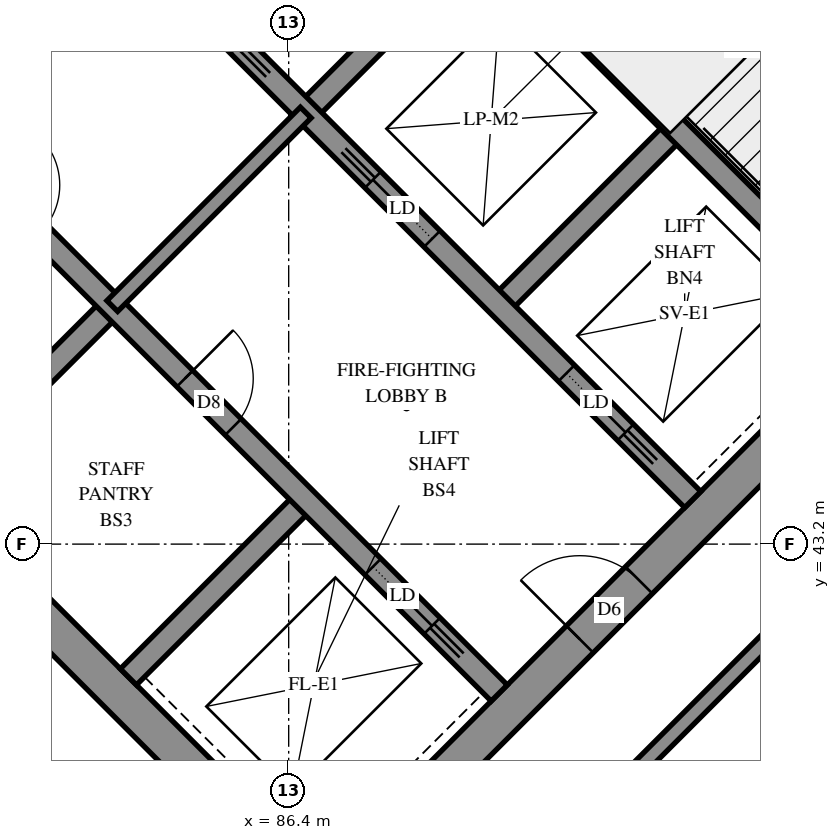
"""IFC4 building model, lengths in metres.
Left out: names, types, materials, properties, quantities, classifications, styles, units other than length and angle.
Written with IfcOpenShell. Run it as: python <this file> out.ifc"""

import sys

from ifc_helpers import new_model, si_unit, direction, frame, frame_2d, origin, place, context, subcontext, project, spatial, rectangle, extrude, element, fill, save


model = new_model("IFC4")
c1 = context("Model", 3, precision=1e-05, world=origin(), true_north=direction((0.0, 1.0)))
c2 = subcontext(c1, "Body", "Model", "MODEL_VIEW")
j1 = project(units=[si_unit("LENGTHUNIT", "METRE"), si_unit("PLANEANGLEUNIT", "RADIAN")], contexts=[c1])
p1 = place(None, origin())
s1 = spatial("IfcSite", under=j1, at=p1, CompositionType="ELEMENT")
p2 = place(p1, origin())
s2 = spatial("IfcBuilding", under=s1, at=p2, CompositionType="ELEMENT")
p3 = place(p2, frame((0.0, 0.0, 227.0)))
s3 = spatial("IfcBuildingStorey", under=s2, at=p3, CompositionType="ELEMENT", Elevation=227.0)
p4 = place(p3, frame((76.124, 49.267, -0.3), z_axis=(0.0, 0.0, 1.0), x_axis=(0.7071067812, -0.7071067812, 0.0)))
e1 = element("IfcWall", 1, at=p4, inside=s3, PredefinedType="SHEAR", context=c2, shape_type="SweptSolid", body=[
    extrude(rectangle(XDim=15.4, YDim=0.5, at=frame_2d((7.7, 0.0))), origin(), (0.0, 0.0, 1.0), 2.7),
])
p5 = place(p3, frame((86.66, 59.802, -0.3), z_axis=(0.0, 0.0, 1.0), x_axis=(0.7071067812, -0.7071067812, 0.0)))
e2 = element("IfcWall", 2, at=p5, inside=s3, PredefinedType="SHEAR", context=c2, shape_type="SweptSolid", body=[
    extrude(rectangle(XDim=15.4, YDim=0.5, at=frame_2d((7.7, 0.0))), origin(), (0.0, 0.0, 1.0), 2.7),
])
p6 = place(p5, frame((10.5, 0.0, 0.3)))
e3 = element("IfcOpeningElement", 3, at=p6, cuts=e2, PredefinedType="OPENING", context=c2, shape_type="SweptSolid", body=[
    extrude(rectangle(XDim=0.8, YDim=2.1, at=frame_2d((0.4, 1.05))), frame((0.0, 0.26, 0.0), z_axis=(0.0, -1.0, 0.0), x_axis=(1.0, 0.0, 0.0)), (0.0, 0.0, 1.0), 0.52),
])
p7 = place(p3, frame((76.478, 49.267, -0.3), z_axis=(0.0, 0.0, 1.0), x_axis=(0.7071067812, 0.7071067812, 0.0)))
e4 = element("IfcWall", 4, at=p7, inside=s3, PredefinedType="SHEAR", context=c2, shape_type="SweptSolid", body=[
    extrude(rectangle(XDim=14.4, YDim=0.5, at=frame_2d((7.2, 0.0))), origin(), (0.0, 0.0, 1.0), 2.7),
])
p8 = place(p7, frame((4.55, 0.0, 0.3)))
e5 = element("IfcOpeningElement", 5, at=p8, cuts=e4, PredefinedType="OPENING", context=c2, shape_type="SweptSolid", body=[
    extrude(rectangle(XDim=1.1, YDim=2.1, at=frame_2d((0.55, 1.05))), frame((0.0, 0.26, 0.0), z_axis=(0.0, -1.0, 0.0), x_axis=(1.0, 0.0, 0.0)), (0.0, 0.0, 1.0), 0.52),
])
p9 = place(p7, frame((11.35, 0.0, 0.3)))
e6 = element("IfcOpeningElement", 6, at=p9, cuts=e4, PredefinedType="OPENING", context=c2, shape_type="SweptSolid", body=[
    extrude(rectangle(XDim=1.1, YDim=2.1, at=frame_2d((0.55, 1.05))), frame((0.0, 0.26, 0.0), z_axis=(0.0, -1.0, 0.0), x_axis=(1.0, 0.0, 0.0)), (0.0, 0.0, 1.0), 0.52),
])
p10 = place(p3, frame((87.013, 38.731, -0.3), z_axis=(0.0, 0.0, 1.0), x_axis=(0.7071067812, 0.7071067812, 0.0)))
e7 = element("IfcWall", 7, at=p10, inside=s3, PredefinedType="SHEAR", context=c2, shape_type="SweptSolid", body=[
    extrude(rectangle(XDim=14.4, YDim=0.5, at=frame_2d((7.2, 0.0))), origin(), (0.0, 0.0, 1.0), 2.7),
])
p11 = place(p10, frame((4.55, 0.0, 0.3)))
e8 = element("IfcOpeningElement", 8, at=p11, cuts=e7, PredefinedType="OPENING", context=c2, shape_type="SweptSolid", body=[
    extrude(rectangle(XDim=1.1, YDim=2.1, at=frame_2d((0.55, 1.05))), frame((0.0, 0.26, 0.0), z_axis=(0.0, -1.0, 0.0), x_axis=(1.0, 0.0, 0.0)), (0.0, 0.0, 1.0), 0.52),
])
p12 = place(p10, frame((11.35, 0.0, 0.3)))
e9 = element("IfcOpeningElement", 9, at=p12, cuts=e7, PredefinedType="OPENING", context=c2, shape_type="SweptSolid", body=[
    extrude(rectangle(XDim=1.1, YDim=2.1, at=frame_2d((0.55, 1.05))), frame((0.0, 0.26, 0.0), z_axis=(0.0, -1.0, 0.0), x_axis=(1.0, 0.0, 0.0)), (0.0, 0.0, 1.0), 0.52),
])
p13 = place(p3, frame((81.746, 43.999, 0.0), z_axis=(0.0, 0.0, 1.0), x_axis=(0.7071067812, 0.7071067812, 0.0)))
e10 = element("IfcWall", 10, at=p13, inside=s3, PredefinedType="SOLIDWALL", context=c2, shape_type="SweptSolid", body=[
    extrude(rectangle(XDim=3.3, YDim=0.3, at=frame_2d((1.65, 0.0))), origin(), (0.0, 0.0, 1.0), 3.1),
])
p14 = place(p3, frame((86.625, 48.878, 0.0), z_axis=(0.0, 0.0, 1.0), x_axis=(0.7071067812, 0.7071067812, 0.0)))
e11 = element("IfcWall", 11, at=p14, inside=s3, PredefinedType="SOLIDWALL", context=c2, shape_type="SweptSolid", body=[
    extrude(rectangle(XDim=3.3, YDim=0.3, at=frame_2d((1.65, 0.0))), origin(), (0.0, 0.0, 1.0), 3.1),
])
p15 = place(p3, frame((84.291, 41.453, 0.0), z_axis=(0.0, 0.0, 1.0), x_axis=(0.7071067812, 0.7071067812, 0.0)))
e12 = element("IfcWall", 12, at=p15, inside=s3, PredefinedType="SOLIDWALL", context=c2, shape_type="SweptSolid", body=[
    extrude(rectangle(XDim=3.3, YDim=0.3, at=frame_2d((1.65, 0.0))), origin(), (0.0, 0.0, 1.0), 3.1),
])
p16 = place(p3, frame((89.17, 46.332, 0.0), z_axis=(0.0, 0.0, 1.0), x_axis=(0.7071067812, 0.7071067812, 0.0)))
e13 = element("IfcWall", 13, at=p16, inside=s3, PredefinedType="SOLIDWALL", context=c2, shape_type="SweptSolid", body=[
    extrude(rectangle(XDim=3.3, YDim=0.3, at=frame_2d((1.65, 0.0))), origin(), (0.0, 0.0, 1.0), 3.1),
])
p17 = place(p3, frame((78.988, 51.423, 0.0), z_axis=(0.0, 0.0, 1.0), x_axis=(0.7071067812, -0.7071067812, 0.0)))
e14 = element("IfcWall", 14, at=p17, inside=s3, PredefinedType="SOLIDWALL", context=c2, shape_type="SweptSolid", body=[
    extrude(rectangle(XDim=14.4, YDim=0.3, at=frame_2d((7.2, 0.0))), origin(), (0.0, 0.0, 1.0), 3.1),
])
p18 = place(p17, frame((1.35, 0.0, 0.0)))
e15 = element("IfcOpeningElement", 15, at=p18, cuts=e14, PredefinedType="OPENING", context=c2, shape_type="SweptSolid", body=[
    extrude(rectangle(XDim=0.9, YDim=2.1, at=frame_2d((0.45, 1.05))), frame((0.0, 0.16, 0.0), z_axis=(0.0, -1.0, 0.0), x_axis=(1.0, 0.0, 0.0)), (0.0, 0.0, 1.0), 0.32),
])
p19 = place(p17, frame((4.95, 0.0, 0.0)))
e16 = element("IfcOpeningElement", 16, at=p19, cuts=e14, PredefinedType="OPENING", context=c2, shape_type="SweptSolid", body=[
    extrude(rectangle(XDim=0.9, YDim=2.1, at=frame_2d((0.45, 1.05))), frame((0.0, 0.16, 0.0), z_axis=(0.0, -1.0, 0.0), x_axis=(1.0, 0.0, 0.0)), (0.0, 0.0, 1.0), 0.32),
])
p20 = place(p17, frame((8.55, 0.0, 0.0)))
e17 = element("IfcOpeningElement", 17, at=p20, cuts=e14, PredefinedType="OPENING", context=c2, shape_type="SweptSolid", body=[
    extrude(rectangle(XDim=0.9, YDim=2.1, at=frame_2d((0.45, 1.05))), frame((0.0, 0.16, 0.0), z_axis=(0.0, -1.0, 0.0), x_axis=(1.0, 0.0, 0.0)), (0.0, 0.0, 1.0), 0.32),
])
p21 = place(p17, frame((12.05, 0.0, 0.0)))
e18 = element("IfcOpeningElement", 18, at=p21, cuts=e14, PredefinedType="OPENING", context=c2, shape_type="SweptSolid", body=[
    extrude(rectangle(XDim=1.1, YDim=2.1, at=frame_2d((0.55, 1.05))), frame((0.0, 0.16, 0.0), z_axis=(0.0, -1.0, 0.0), x_axis=(1.0, 0.0, 0.0)), (0.0, 0.0, 1.0), 0.32),
])
p22 = place(p3, frame((81.534, 53.969, 0.0), z_axis=(0.0, 0.0, 1.0), x_axis=(0.707103309, -0.7071102534, 0.0)))
e19 = element("IfcWall", 19, at=p22, inside=s3, PredefinedType="SOLIDWALL", context=c2, shape_type="SweptSolid", body=[
    extrude(rectangle(XDim=14.4, YDim=0.3, at=frame_2d((7.2, 0.0))), origin(), (0.0, 0.0, 1.0), 3.1),
])
p23 = place(p22, frame((1.25, 0.0, 0.0)))
e20 = element("IfcOpeningElement", 20, at=p23, cuts=e19, PredefinedType="OPENING", context=c2, shape_type="SweptSolid", body=[
    extrude(rectangle(XDim=1.1, YDim=2.1, at=frame_2d((0.55, 1.05))), frame((0.0, 0.16, 0.0), z_axis=(0.0, -1.0, 0.0), x_axis=(1.0, 0.0, 0.0)), (0.0, 0.0, 1.0), 0.32),
])
p24 = place(p22, frame((4.85, 0.0, 0.0)))
e21 = element("IfcOpeningElement", 21, at=p24, cuts=e19, PredefinedType="OPENING", context=c2, shape_type="SweptSolid", body=[
    extrude(rectangle(XDim=1.1, YDim=2.1, at=frame_2d((0.55, 1.05))), frame((0.0, 0.16, 0.0), z_axis=(0.0, -1.0, 0.0), x_axis=(1.0, 0.0, 0.0)), (0.0, 0.0, 1.0), 0.32),
])
p25 = place(p22, frame((8.45, 0.0, 0.0)))
e22 = element("IfcOpeningElement", 22, at=p25, cuts=e19, PredefinedType="OPENING", context=c2, shape_type="SweptSolid", body=[
    extrude(rectangle(XDim=1.1, YDim=2.1, at=frame_2d((0.55, 1.05))), frame((0.0, 0.16, 0.0), z_axis=(0.0, -1.0, 0.0), x_axis=(1.0, 0.0, 0.0)), (0.0, 0.0, 1.0), 0.32),
])
p26 = place(p22, frame((12.05, 0.0, 0.0)))
e23 = element("IfcOpeningElement", 23, at=p26, cuts=e19, PredefinedType="OPENING", context=c2, shape_type="SweptSolid", body=[
    extrude(rectangle(XDim=1.1, YDim=2.1, at=frame_2d((0.55, 1.05))), frame((0.0, 0.16, 0.0), z_axis=(0.0, -1.0, 0.0), x_axis=(1.0, 0.0, 0.0)), (0.0, 0.0, 1.0), 0.32),
])
p27 = place(p3, frame((88.958, 51.211, 0.0), z_axis=(0.0, 0.0, 1.0), x_axis=(0.7070998367, -0.7071137256, 0.0)))
e24 = element("IfcWall", 24, at=p27, inside=s3, PredefinedType="SOLIDWALL", context=c2, shape_type="SweptSolid", body=[
    extrude(rectangle(XDim=7.2, YDim=0.3, at=frame_2d((3.6, 0.0))), origin(), (0.0, 0.0, 1.0), 3.1),
])
p28 = place(p3, frame((91.313, 53.354, 0.0), z_axis=(0.0, 0.0, 1.0), x_axis=(0.7071067812, -0.7071067812, 0.0)))
e25 = element("IfcWall", 25, at=p28, inside=s3, PredefinedType="PARTITIONING", context=c2, shape_type="SweptSolid", body=[
    extrude(rectangle(XDim=5.95, YDim=0.15, at=frame_2d((2.975, 0.0))), origin(), (0.0, 0.0, 1.0), 3.1),
])
p29 = place(p3, frame((84.079, 46.332, 0.0), z_axis=(0.0, 0.0, 1.0), x_axis=(0.7071067812, 0.7071067812, 0.0)))
e26 = element("IfcWall", 26, at=p29, inside=s3, PredefinedType="PARTITIONING", context=c2, shape_type="SweptSolid", body=[
    extrude(rectangle(XDim=3.6, YDim=0.2, at=frame_2d((1.8, 0.0))), origin(), (0.0, 0.0, 1.0), 3.1),
])
p30 = place(p3, frame((85.026, 32.008, 0.0), z_axis=(0.0, 0.0, 1.0), x_axis=(0.7071030933, 0.707110469, 0.0)))
e27 = element("IfcWall", 27, at=p30, inside=s3, PredefinedType="PARTITIONING", context=c2, shape_type="SweptSolid", body=[
    extrude(rectangle(XDim=13.558, YDim=0.2, at=frame_2d((6.779, 0.0))), origin(), (0.0, 0.0, 1.0), 3.1),
])
p31 = place(p3, frame((86.835, 36.079, 0.0), z_axis=(0.0, 0.0, 1.0), x_axis=(0.7071067812, 0.7071067812, 0.0)))
e28 = element("IfcWall", 28, at=p31, inside=s3, PredefinedType="PARTITIONING", context=c2, shape_type="SweptSolid", body=[
    extrude(rectangle(XDim=9.402, YDim=0.2, at=frame_2d((4.701, 0.0))), origin(), (0.0, 0.0, 1.0), 3.1),
])
p32 = place(p3, frame((80.849, 42.061, 0.0), z_axis=(0.0, 0.0, 1.0), x_axis=(0.7071067812, -0.7071067812, 0.0)))
e29 = element("IfcWall", 29, at=p32, inside=s3, PredefinedType="PARTITIONING", context=c2, shape_type="SweptSolid", body=[
    extrude(rectangle(XDim=6.964, YDim=0.2, at=frame_2d((3.482, 0.0))), origin(), (0.0, 0.0, 1.0), 3.1),
])
p33 = place(p32, frame((5.159, 0.0, 0.0)))
e30 = element("IfcOpeningElement", 30, at=p33, cuts=e29, PredefinedType="OPENING", context=c2, shape_type="SweptSolid", body=[
    extrude(rectangle(XDim=0.9, YDim=2.1, at=frame_2d((0.45, 1.05))), frame((0.0, 0.11, 0.0), z_axis=(0.0, -1.0, 0.0), x_axis=(1.0, 0.0, 0.0)), (0.0, 0.0, 1.0), 0.22),
])
p34 = place(p11, origin())
e31 = element("IfcDoor", 31, at=p34, inside=s3, OperationType="DOUBLE_DOOR_SINGLE_SWING", PredefinedType="DOOR", context=c2, shape_type="SweptSolid", body=[
    extrude(rectangle(XDim=1.1, YDim=2.1, at=frame_2d((0.55, 1.05))), frame((0.0, 0.025, 0.0), z_axis=(0.0, -1.0, 0.0), x_axis=(1.0, 0.0, 0.0)), (0.0, 0.0, 1.0), 0.05),
])
fill(e8, e31)
p35 = place(p20, origin())
e32 = element("IfcDoor", 32, at=p35, inside=s3, OperationType="SINGLE_SWING_LEFT", PredefinedType="DOOR", context=c2, shape_type="SweptSolid", body=[
    extrude(rectangle(XDim=0.9, YDim=2.1, at=frame_2d((0.45, 1.05))), frame((0.0, 0.025, 0.0), z_axis=(0.0, -1.0, 0.0), x_axis=(1.0, 0.0, 0.0)), (0.0, 0.0, 1.0), 0.05),
])
fill(e17, e32)
p36 = place(p21, origin())
e33 = element("IfcDoor", 33, at=p36, inside=s3, OperationType="SLIDING_TO_RIGHT", PredefinedType="DOOR", context=c2, shape_type="SweptSolid", body=[
    extrude(rectangle(XDim=1.1, YDim=2.1, at=frame_2d((0.55, 1.05))), frame((0.0, 0.025, 0.0), z_axis=(0.0, -1.0, 0.0), x_axis=(1.0, 0.0, 0.0)), (0.0, 0.0, 1.0), 0.05),
])
fill(e18, e33)
p37 = place(p25, origin())
e34 = element("IfcDoor", 34, at=p37, inside=s3, OperationType="SLIDING_TO_LEFT", PredefinedType="DOOR", context=c2, shape_type="SweptSolid", body=[
    extrude(rectangle(XDim=1.1, YDim=2.1, at=frame_2d((0.55, 1.05))), frame((0.0, 0.025, 0.0), z_axis=(0.0, -1.0, 0.0), x_axis=(1.0, 0.0, 0.0)), (0.0, 0.0, 1.0), 0.05),
])
fill(e22, e34)
p38 = place(p26, origin())
e35 = element("IfcDoor", 35, at=p38, inside=s3, OperationType="SLIDING_TO_RIGHT", PredefinedType="DOOR", context=c2, shape_type="SweptSolid", body=[
    extrude(rectangle(XDim=1.1, YDim=2.1, at=frame_2d((0.55, 1.05))), frame((0.0, 0.025, 0.0), z_axis=(0.0, -1.0, 0.0), x_axis=(1.0, 0.0, 0.0)), (0.0, 0.0, 1.0), 0.05),
])
fill(e23, e35)
save(model, sys.argv[1])
